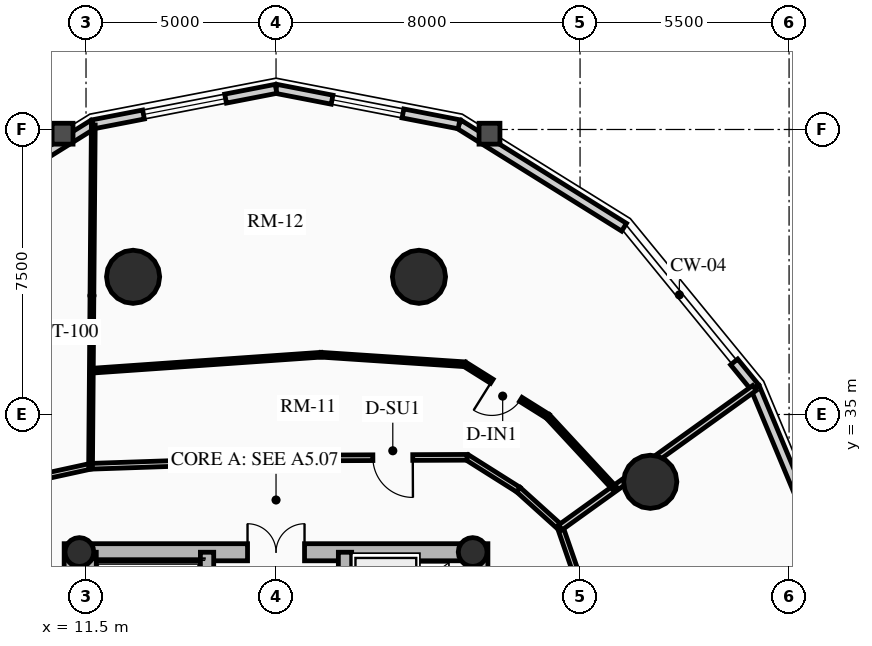
"""IFC4 building model, lengths in metres.
Left out: names, types, materials, properties, quantities, classifications, styles, units other than length and angle.
Written with IfcOpenShell. Run it as: python <this file> out.ifc"""

import sys

from ifc_helpers import new_model, si_unit, direction, frame, frame_2d, origin, origin_2d, place, context, subcontext, project, spatial, rectangle, circle, hollow_circle, extrude, source, transform, mapped, element, fill, save


model = new_model("IFC4")
c1 = context("Model", 3, precision=1e-05, world=origin(), true_north=direction((0.0, 1.0)))
c2 = subcontext(c1, "Body", "Model", "MODEL_VIEW")
j1 = project(units=[si_unit("LENGTHUNIT", "METRE"), si_unit("PLANEANGLEUNIT", "RADIAN")], contexts=[c1])
p1 = place(None, origin())
s1 = spatial("IfcSite", under=j1, at=p1, CompositionType="ELEMENT")
p2 = place(p1, origin())
s2 = spatial("IfcBuilding", under=s1, at=p2, CompositionType="ELEMENT")
p3 = place(p2, frame((0.0, 0.0, 125.44)))
s3 = spatial("IfcBuildingStorey", under=s2, at=p3, CompositionType="ELEMENT", Elevation=125.44)
for number, where, z_axis, x_axis in (
    (1, (11.15, 17.4, 0.0), (0.0, 0.0, 1.0), (0.0, 1.0, 0.0)),
    (2, (21.85, 17.4, 0.0), (0.0, 0.0, 1.0), (0.0, 1.0, 0.0)),
):
    element("IfcWall", number, at=place(p3, frame(where, z_axis=z_axis, x_axis=x_axis)), inside=s3, PredefinedType="SHEAR", context=c2, shape_type="SweptSolid", body=[
        extrude(rectangle(XDim=14.2, YDim=0.45, at=frame_2d((7.1, 0.0))), origin(), (0.0, 0.0, 1.0), 3.72),
    ])
p4 = place(p3, frame((11.15, 31.375, 0.0), z_axis=(0.0, 0.0, 1.0), x_axis=(1.0, 0.0, 0.0)))
e3 = element("IfcWall", 3, at=p4, inside=s3, PredefinedType="SHEAR", context=c2, shape_type="SweptSolid", body=[
    extrude(rectangle(XDim=10.7, YDim=0.45, at=frame_2d((5.35, 0.0))), origin(), (0.0, 0.0, 1.0), 3.72),
])
m1 = source(origin(), c2, "Body", "SweptSolid", [
    extrude(rectangle(XDim=1.5, YDim=2.02, at=frame_2d((0.75, 1.01))), frame((0.0, 0.235, 0.0), z_axis=(0.0, -1.0, 0.0), x_axis=(1.0, 0.0, 0.0)), (0.0, 0.0, 1.0), 0.47),
])
p5 = place(p4, frame((4.6, 0.0, 0.0)))
e4 = element("IfcOpeningElement", 4, at=p5, cuts=e3, PredefinedType="OPENING", context=c2, shape_type="MappedRepresentation", body=[
    mapped(m1, transform((0.0, 0.0, 0.0), x_axis=(1.0, 0.0, 0.0), y_axis=(0.0, 1.0, 0.0), z_axis=(0.0, 0.0, 1.0), scale=1.0)),
])
p6 = place(p3, frame((14.685, 17.625, 0.0), z_axis=(0.0, 0.0, 1.0), x_axis=(0.0, 1.0, 0.0)))
e5 = element("IfcWall", 5, at=p6, inside=s3, PredefinedType="SHEAR", context=c2, shape_type="SweptSolid", body=[
    extrude(rectangle(XDim=13.75, YDim=0.35, at=frame_2d((6.875, 0.0))), origin(), (0.0, 0.0, 1.0), 3.72),
])
m2 = source(origin(), c2, "Body", "SweptSolid", [
    extrude(rectangle(XDim=1.1, YDim=2.015, at=frame_2d((0.55, 1.007))), frame((0.0, 0.185, 0.0), z_axis=(0.0, -1.0, 0.0), x_axis=(1.0, 0.0, 0.0)), (0.0, 0.0, 1.0), 0.37),
])
p7 = place(p6, frame((4.875, 0.0, 0.0)))
e6 = element("IfcOpeningElement", 6, at=p7, cuts=e5, PredefinedType="OPENING", context=c2, shape_type="MappedRepresentation", body=[
    mapped(m2, transform((0.0, 0.0, 0.0), x_axis=(1.0, 0.0, 0.0), y_axis=(0.0, 1.0, 0.0), z_axis=(0.0, 0.0, 1.0), scale=1.0)),
])
p8 = place(p6, frame((0.65, 0.0, 0.0)))
e7 = element("IfcOpeningElement", 7, at=p8, cuts=e5, PredefinedType="OPENING", context=c2, shape_type="MappedRepresentation", body=[
    mapped(m2, transform((0.0, 0.0, 0.0), x_axis=(1.0, 0.0, 0.0), y_axis=(0.0, 1.0, 0.0), z_axis=(0.0, 0.0, 1.0), scale=1.0)),
])
p9 = place(p6, frame((2.65, 0.0, 0.0)))
e8 = element("IfcOpeningElement", 8, at=p9, cuts=e5, PredefinedType="OPENING", context=c2, shape_type="MappedRepresentation", body=[
    mapped(m2, transform((0.0, 0.0, 0.0), x_axis=(1.0, 0.0, 0.0), y_axis=(0.0, 1.0, 0.0), z_axis=(0.0, 0.0, 1.0), scale=1.0)),
])
m3 = source(origin(), c2, "Body", "SweptSolid", [
    extrude(rectangle(XDim=1.15, YDim=2.02, at=frame_2d((0.575, 1.01))), frame((0.0, 0.185, 0.0), z_axis=(0.0, -1.0, 0.0), x_axis=(1.0, 0.0, 0.0)), (0.0, 0.0, 1.0), 0.37),
])
p10 = place(p6, frame((7.295, 0.0, 0.0)))
e9 = element("IfcOpeningElement", 9, at=p10, cuts=e5, PredefinedType="OPENING", context=c2, shape_type="MappedRepresentation", body=[
    mapped(m3, transform((0.0, 0.0, 0.0), x_axis=(1.0, 0.0, 0.0), y_axis=(0.0, 1.0, 0.0), z_axis=(0.0, 0.0, 1.0), scale=1.0)),
])
p11 = place(p3, frame((18.315, 17.625, 0.0), z_axis=(0.0, 0.0, 1.0), x_axis=(0.0, 1.0, 0.0)))
e10 = element("IfcWall", 10, at=p11, inside=s3, PredefinedType="SHEAR", context=c2, shape_type="SweptSolid", body=[
    extrude(rectangle(XDim=13.75, YDim=0.35, at=frame_2d((6.875, 0.0))), origin(), (0.0, 0.0, 1.0), 3.72),
])
p12 = place(p11, frame((10.0, 0.0, 0.0)))
e11 = element("IfcOpeningElement", 11, at=p12, cuts=e10, PredefinedType="OPENING", context=c2, shape_type="MappedRepresentation", body=[
    mapped(m2, transform((0.0, 0.0, 0.0), x_axis=(1.0, 0.0, 0.0), y_axis=(0.0, 1.0, 0.0), z_axis=(0.0, 0.0, 1.0), scale=1.0)),
])
p13 = place(p11, frame((12.0, 0.0, 0.0)))
e12 = element("IfcOpeningElement", 12, at=p13, cuts=e10, PredefinedType="OPENING", context=c2, shape_type="MappedRepresentation", body=[
    mapped(m2, transform((0.0, 0.0, 0.0), x_axis=(1.0, 0.0, 0.0), y_axis=(0.0, 1.0, 0.0), z_axis=(0.0, 0.0, 1.0), scale=1.0)),
])
p14 = place(p11, frame((5.305, 0.0, 0.0)))
e13 = element("IfcOpeningElement", 13, at=p14, cuts=e10, PredefinedType="OPENING", context=c2, shape_type="MappedRepresentation", body=[
    mapped(m3, transform((0.0, 0.0, 0.0), x_axis=(1.0, 0.0, 0.0), y_axis=(0.0, 1.0, 0.0), z_axis=(0.0, 0.0, 1.0), scale=1.0)),
])
p15 = place(p3, frame((11.595, 24.655, 0.0), z_axis=(0.0, 0.0, 1.0), x_axis=(0.0, 1.0, 0.0)))
e14 = element("IfcWall", 14, at=p15, inside=s3, PredefinedType="SHEAR", context=c2, shape_type="SweptSolid", body=[
    extrude(rectangle(XDim=6.72, YDim=0.35, at=frame_2d((3.36, 0.0))), origin(), (0.0, 0.0, 1.0), 3.72),
])
for number, where, z_axis, x_axis in (
    (15, (11.325, 31.38, 0.0), (0.0, 0.0, 1.0), (1.0, 0.0, 0.0)),
    (16, (21.675, 31.38, 0.0), (0.0, 0.0, 1.0), (1.0, 0.0, 0.0)),
):
    element("IfcColumn", number, at=place(p3, frame(where, z_axis=z_axis, x_axis=x_axis)), inside=s3, PredefinedType="COLUMN", context=c2, shape_type="SweptSolid", body=[
        extrude(hollow_circle(Radius=0.38, WallThickness=0.032, at=origin_2d()), origin(), (0.0, 0.0, 1.0), 3.72),
    ])
for number, where, z_axis, x_axis in (
    (17, (26.347, 33.229, 0.0), (0.0, 0.0, 1.0), (1.0, 0.0, 0.0)),
    (18, (20.261, 38.623, 0.0), (0.0, 0.0, 1.0), (1.0, 0.0, 0.0)),
    (19, (12.739, 38.623, 0.0), (0.0, 0.0, 1.0), (1.0, 0.0, 0.0)),
):
    element("IfcColumn", number, at=place(p3, frame(where, z_axis=z_axis, x_axis=x_axis)), inside=s3, PredefinedType="USERDEFINED", context=c2, shape_type="SweptSolid", body=[
        extrude(circle(Radius=0.7, at=origin_2d()), origin(), (0.0, 0.0, 1.0), 3.72),
    ])
p16 = place(p3, frame((29.105, 35.709, 0.0), z_axis=(0.0, 0.0, 1.0), x_axis=(0.384344417632, -0.923189779317, 0.0)))
e20 = element("IfcWall", 20, at=p16, inside=s3, PredefinedType="SOLIDWALL", context=c2, shape_type="SweptSolid", body=[
    extrude(rectangle(XDim=5.758, YDim=0.24, at=frame_2d((2.879, 0.0))), origin(), (0.0, 0.0, 1.0), 2.949),
])
p17 = place(p3, frame((28.555, 36.383, 0.0), z_axis=(0.0, 0.0, 1.0), x_axis=(0.632702874536, -0.774394649099, 0.0)))
e21 = element("IfcWall", 21, at=p17, inside=s3, PredefinedType="SOLIDWALL", context=c2, shape_type="SweptSolid", body=[
    extrude(rectangle(XDim=0.87, YDim=0.24, at=frame_2d((0.435, 0.0))), origin(), (0.0, 0.0, 1.0), 2.949),
])
p18 = place(p3, frame((21.315, 42.637, 0.0), z_axis=(0.0, 0.0, 1.0), x_axis=(0.848520380187, -0.529162701263, 0.0)))
e22 = element("IfcWall", 22, at=p18, inside=s3, PredefinedType="SOLIDWALL", context=c2, shape_type="SweptSolid", body=[
    extrude(rectangle(XDim=5.119, YDim=0.24, at=frame_2d((2.56, 0.0))), origin(), (0.0, 0.0, 1.0), 2.949),
])
p19 = place(p3, frame((16.5, 43.57, 0.0), z_axis=(0.0, 0.0, 1.0), x_axis=(0.981723785992, -0.190311344954, 0.0)))
e23 = element("IfcWall", 23, at=p19, inside=s3, PredefinedType="SOLIDWALL", context=c2, shape_type="SweptSolid", body=[
    extrude(rectangle(XDim=4.904, YDim=0.24, at=frame_2d((2.452, 0.0))), origin(), (0.0, 0.0, 1.0), 2.949),
])
m4 = source(origin(), c2, "Body", "SweptSolid", [
    extrude(rectangle(XDim=1.9, YDim=1.35, at=frame_2d((0.95, 0.675))), frame((0.0, 0.13, 0.0), z_axis=(0.0, -1.0, 0.0), x_axis=(1.0, 0.0, 0.0)), (0.0, 0.0, 1.0), 0.26),
])
p20 = place(p19, frame((1.502, 0.0, 0.65)))
e24 = element("IfcOpeningElement", 24, at=p20, cuts=e23, PredefinedType="OPENING", context=c2, shape_type="MappedRepresentation", body=[
    mapped(m4, transform((0.0, 0.0, 0.0), x_axis=(1.0, 0.0, 0.0), y_axis=(0.0, 1.0, 0.0), z_axis=(0.0, 0.0, 1.0), scale=1.0)),
])
p21 = place(p3, frame((11.685, 42.637, 0.0), z_axis=(0.0, 0.0, 1.0), x_axis=(0.981723785992, 0.190311344954, 0.0)))
e25 = element("IfcWall", 25, at=p21, inside=s3, PredefinedType="SOLIDWALL", context=c2, shape_type="SweptSolid", body=[
    extrude(rectangle(XDim=4.904, YDim=0.24, at=frame_2d((2.452, 0.0))), origin(), (0.0, 0.0, 1.0), 2.949),
])
m5 = source(origin(), c2, "Body", "SweptSolid", [
    extrude(rectangle(XDim=2.2, YDim=1.35, at=frame_2d((1.1, 0.675))), frame((0.0, 0.13, 0.0), z_axis=(0.0, -1.0, 0.0), x_axis=(1.0, 0.0, 0.0)), (0.0, 0.0, 1.0), 0.26),
])
p22 = place(p21, frame((1.352, 0.0, 0.65)))
e26 = element("IfcOpeningElement", 26, at=p22, cuts=e25, PredefinedType="OPENING", context=c2, shape_type="MappedRepresentation", body=[
    mapped(m5, transform((0.0, 0.0, 0.0), x_axis=(1.0, 0.0, 0.0), y_axis=(0.0, 1.0, 0.0), z_axis=(0.0, 0.0, 1.0), scale=1.0)),
])
p23 = place(p3, frame((7.342, 39.928, 0.0), z_axis=(0.0, 0.0, 1.0), x_axis=(0.848520380187, 0.529162701263, 0.0)))
e27 = element("IfcWall", 27, at=p23, inside=s3, PredefinedType="SOLIDWALL", context=c2, shape_type="SweptSolid", body=[
    extrude(rectangle(XDim=5.119, YDim=0.24, at=frame_2d((2.56, 0.0))), origin(), (0.0, 0.0, 1.0), 2.949),
])
p24 = place(p3, frame((24.469, 30.614, 0.0), z_axis=(0.0, 0.0, 1.0), x_axis=(-0.327228335485, 0.944945298129, 0.0)))
e28 = element("IfcWall", 28, at=p24, inside=s3, PredefinedType="PARTITIONING", context=c2, shape_type="SweptSolid", body=[
    extrude(rectangle(XDim=1.495, YDim=0.15, at=frame_2d((0.748, 0.0))), origin(), (0.0, 0.0, 1.0), 2.995),
])
p25 = place(p3, frame((23.98, 32.027, 0.0), z_axis=(0.0, 0.0, 1.0), x_axis=(-0.742353224332, 0.670008724065, 0.0)))
e29 = element("IfcWall", 29, at=p25, inside=s3, PredefinedType="PARTITIONING", context=c2, shape_type="SweptSolid", body=[
    extrude(rectangle(XDim=1.485, YDim=0.15, at=frame_2d((0.742, 0.0))), origin(), (0.0, 0.0, 1.0), 2.995),
])
p26 = place(p3, frame((22.877, 33.022, 0.0), z_axis=(0.0, 0.0, 1.0), x_axis=(-0.845895608855, 0.533348496689, 0.0)))
e30 = element("IfcWall", 30, at=p26, inside=s3, PredefinedType="PARTITIONING", context=c2, shape_type="SweptSolid", body=[
    extrude(rectangle(XDim=1.597, YDim=0.15, at=frame_2d((0.798, 0.0))), origin(), (0.0, 0.0, 1.0), 2.995),
])
p27 = place(p3, frame((21.527, 33.873, 0.0), z_axis=(0.0, 0.0, 1.0), x_axis=(-0.999991838845, -0.004040079574, 0.0)))
e31 = element("IfcWall", 31, at=p27, inside=s3, PredefinedType="PARTITIONING", context=c2, shape_type="SweptSolid", body=[
    extrude(rectangle(XDim=3.384, YDim=0.15, at=frame_2d((1.692, 0.0))), origin(), (0.0, 0.0, 1.0), 2.995),
])
m6 = source(origin(), c2, "Body", "SweptSolid", [
    extrude(rectangle(XDim=1.05, YDim=2.015, at=frame_2d((0.525, 1.007))), frame((0.0, 0.085, 0.0), z_axis=(0.0, -1.0, 0.0), x_axis=(1.0, 0.0, 0.0)), (0.0, 0.0, 1.0), 0.17),
])
p28 = place(p27, frame((1.429, 0.0, 0.0)))
e32 = element("IfcOpeningElement", 32, at=p28, cuts=e31, PredefinedType="OPENING", context=c2, shape_type="MappedRepresentation", body=[
    mapped(m6, transform((0.0, 0.0, 0.0), x_axis=(1.0, 0.0, 0.0), y_axis=(0.0, 1.0, 0.0), z_axis=(0.0, 0.0, 1.0), scale=1.0)),
])
p29 = place(p3, frame((18.143, 33.86, 0.0), z_axis=(0.0, 0.0, 1.0), x_axis=(-0.999419208319, -0.034077060363, 0.0)))
e33 = element("IfcWall", 33, at=p29, inside=s3, PredefinedType="PARTITIONING", context=c2, shape_type="SweptSolid", body=[
    extrude(rectangle(XDim=6.527, YDim=0.15, at=frame_2d((3.263, 0.0))), origin(), (0.0, 0.0, 1.0), 2.995),
])
p30 = place(p3, frame((11.62, 33.637, 0.0), z_axis=(0.0, 0.0, 1.0), x_axis=(-0.97702579435, -0.213121085711, 0.0)))
e34 = element("IfcWall", 34, at=p30, inside=s3, PredefinedType="PARTITIONING", context=c2, shape_type="SweptSolid", body=[
    extrude(rectangle(XDim=1.935, YDim=0.15, at=frame_2d((0.967, 0.0))), origin(), (0.0, 0.0, 1.0), 2.995),
])
p31 = place(p3, frame((23.98, 32.027, 0.0), z_axis=(0.0, 0.0, 1.0), x_axis=(0.812162479031, 0.58343132214, 0.0)))
e35 = element("IfcWall", 35, at=p31, inside=s3, PredefinedType="PARTITIONING", context=c2, shape_type="SweptSolid", body=[
    extrude(rectangle(XDim=6.291, YDim=0.16, at=frame_2d((3.146, 0.0))), origin(), (0.0, 0.0, 1.0), 2.949),
])
p32 = place(p3, frame((11.62, 33.637, 0.0), z_axis=(0.0, 0.0, 1.0), x_axis=(0.007965167065, 0.999968277554, 0.0)))
e36 = element("IfcWall", 36, at=p32, inside=s3, PredefinedType="MOVABLE", context=c2, shape_type="SweptSolid", body=[
    extrude(rectangle(XDim=8.981, YDim=0.1, at=frame_2d((4.49, 0.0))), origin(), (0.0, 0.0, 1.0), 2.949),
])
p33 = place(p3, frame((25.41, 33.054, 0.0), z_axis=(0.0, 0.0, 1.0), x_axis=(-0.679733694606, 0.73345899982, 0.0)))
e37 = element("IfcWall", 37, at=p33, inside=s3, PredefinedType="PARTITIONING", context=c2, shape_type="SweptSolid", body=[
    extrude(rectangle(XDim=2.586, YDim=0.125, at=frame_2d((1.293, 0.0))), origin(), (0.0, 0.0, 1.0), 3.425),
])
p34 = place(p3, frame((23.653, 34.951, 0.0), z_axis=(0.0, 0.0, 1.0), x_axis=(-0.847306782665, 0.531103771452, 0.0)))
e38 = element("IfcWall", 38, at=p34, inside=s3, PredefinedType="PARTITIONING", context=c2, shape_type="SweptSolid", body=[
    extrude(rectangle(XDim=2.581, YDim=0.125, at=frame_2d((1.291, 0.0))), origin(), (0.0, 0.0, 1.0), 2.995),
])
m7 = source(origin(), c2, "Body", "SweptSolid", [
    extrude(rectangle(XDim=0.9, YDim=2.005, at=frame_2d((0.45, 1.002))), frame((0.0, 0.073, 0.0), z_axis=(0.0, -1.0, 0.0), x_axis=(1.0, 0.0, 0.0)), (0.0, 0.0, 1.0), 0.145),
])
p35 = place(p34, frame((0.841, 0.0, 0.0)))
e39 = element("IfcOpeningElement", 39, at=p35, cuts=e38, PredefinedType="OPENING", context=c2, shape_type="MappedRepresentation", body=[
    mapped(m7, transform((0.0, 0.0, 0.0), x_axis=(1.0, 0.0, 0.0), y_axis=(0.0, 1.0, 0.0), z_axis=(0.0, 0.0, 1.0), scale=1.0)),
])
p36 = place(p3, frame((21.466, 36.322, 0.0), z_axis=(0.0, 0.0, 1.0), x_axis=(-0.997806476515, 0.066198454847, 0.0)))
e40 = element("IfcWall", 40, at=p36, inside=s3, PredefinedType="PARTITIONING", context=c2, shape_type="SweptSolid", body=[
    extrude(rectangle(XDim=3.791, YDim=0.125, at=frame_2d((1.896, 0.0))), origin(), (0.0, 0.0, 1.0), 2.995),
])
p37 = place(p3, frame((17.683, 36.573, 0.0), z_axis=(0.0, 0.0, 1.0), x_axis=(-0.997580369038, -0.069522710754, 0.0)))
e41 = element("IfcWall", 41, at=p37, inside=s3, PredefinedType="PARTITIONING", context=c2, shape_type="SweptSolid", body=[
    extrude(rectangle(XDim=6.058, YDim=0.125, at=frame_2d((3.029, 0.0))), origin(), (0.0, 0.0, 1.0), 2.995),
])
m8 = source(origin(), c2, "Body", "SweptSolid", [
    extrude(rectangle(XDim=1.9, YDim=1.35, at=frame_2d((0.95, 0.675))), frame((0.0, 0.03, 0.0), z_axis=(0.0, -1.0, 0.0), x_axis=(1.0, 0.0, 0.0)), (0.0, 0.0, 1.0), 0.06),
])
p38 = place(p20, origin())
e42 = element("IfcWindow", 42, at=p38, inside=s3, PartitioningType="DOUBLE_PANEL_VERTICAL", PredefinedType="WINDOW", context=c2, shape_type="MappedRepresentation", body=[
    mapped(m8, transform((0.0, 0.0, 0.0), x_axis=(1.0, 0.0, 0.0), y_axis=(0.0, 1.0, 0.0), z_axis=(0.0, 0.0, 1.0), scale=1.0)),
])
fill(e24, e42)
m9 = source(origin(), c2, "Body", "SweptSolid", [
    extrude(rectangle(XDim=2.2, YDim=1.35, at=frame_2d((1.1, 0.675))), frame((0.0, 0.03, 0.0), z_axis=(0.0, -1.0, 0.0), x_axis=(1.0, 0.0, 0.0)), (0.0, 0.0, 1.0), 0.06),
])
p39 = place(p22, origin())
e43 = element("IfcWindow", 43, at=p39, inside=s3, PartitioningType="DOUBLE_PANEL_VERTICAL", PredefinedType="WINDOW", context=c2, shape_type="MappedRepresentation", body=[
    mapped(m9, transform((0.0, 0.0, 0.0), x_axis=(1.0, 0.0, 0.0), y_axis=(0.0, 1.0, 0.0), z_axis=(0.0, 0.0, 1.0), scale=1.0)),
])
fill(e26, e43)
m10 = source(origin(), c2, "Body", "SweptSolid", [
    extrude(rectangle(XDim=1.5, YDim=2.02, at=frame_2d((0.75, 1.01))), frame((0.0, 0.025, 0.0), z_axis=(0.0, -1.0, 0.0), x_axis=(1.0, 0.0, 0.0)), (0.0, 0.0, 1.0), 0.05),
])
p40 = place(p5, origin())
e44 = element("IfcDoor", 44, at=p40, inside=s3, OperationType="DOUBLE_DOOR_SINGLE_SWING", PredefinedType="DOOR", context=c2, shape_type="MappedRepresentation", body=[
    mapped(m10, transform((0.0, 0.0, 0.0), x_axis=(1.0, 0.0, 0.0), y_axis=(0.0, 1.0, 0.0), z_axis=(0.0, 0.0, 1.0), scale=1.0)),
])
fill(e4, e44)
m11 = source(origin(), c2, "Body", "SweptSolid", [
    extrude(rectangle(XDim=1.05, YDim=2.015, at=frame_2d((0.525, 1.007))), frame((0.0, 0.025, 0.0), z_axis=(0.0, -1.0, 0.0), x_axis=(1.0, 0.0, 0.0)), (0.0, 0.0, 1.0), 0.05),
])
p41 = place(p28, origin())
e45 = element("IfcDoor", 45, at=p41, inside=s3, OperationType="SINGLE_SWING_LEFT", PredefinedType="DOOR", context=c2, shape_type="MappedRepresentation", body=[
    mapped(m11, transform((0.0, 0.0, 0.0), x_axis=(1.0, 0.0, 0.0), y_axis=(0.0, 1.0, 0.0), z_axis=(0.0, 0.0, 1.0), scale=1.0)),
])
fill(e32, e45)
m12 = source(origin(), c2, "Body", "SweptSolid", [
    extrude(rectangle(XDim=0.9, YDim=2.005, at=frame_2d((0.45, 1.002))), frame((0.0, 0.025, 0.0), z_axis=(0.0, -1.0, 0.0), x_axis=(1.0, 0.0, 0.0)), (0.0, 0.0, 1.0), 0.05),
])
p42 = place(p35, origin())
e46 = element("IfcDoor", 46, at=p42, inside=s3, OperationType="SINGLE_SWING_RIGHT", PredefinedType="DOOR", context=c2, shape_type="MappedRepresentation", body=[
    mapped(m12, transform((0.0, 0.0, 0.0), x_axis=(1.0, 0.0, 0.0), y_axis=(0.0, 1.0, 0.0), z_axis=(0.0, 0.0, 1.0), scale=1.0)),
])
fill(e39, e46)
save(model, sys.argv[1])
